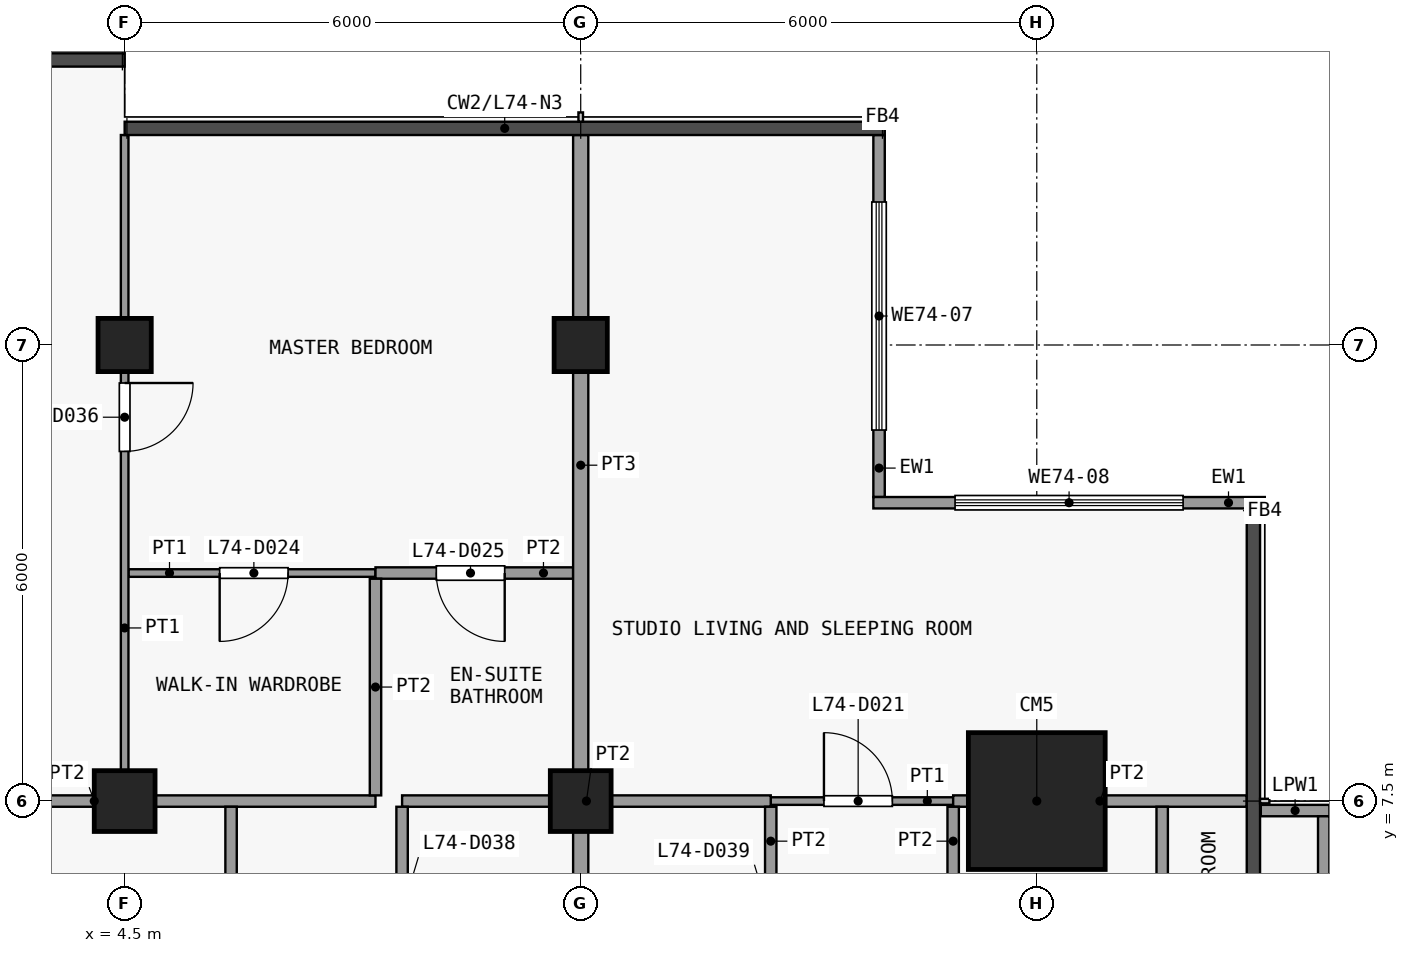
"""IFC4 building model, lengths in metres.
Left out: names, types, materials, properties, quantities, classifications, styles, units other than length and angle.
Written with IfcOpenShell. Run it as: python <this file> out.ifc"""

import sys

from ifc_helpers import new_model, si_unit, direction, frame, frame_2d, origin, origin_2d, place, context, subcontext, project, spatial, rectangle, extrude, element, fill, save


model = new_model("IFC4")
c1 = context("Model", 3, precision=1e-05, world=origin(), true_north=direction((0.0, 1.0)))
c2 = subcontext(c1, "Body", "Model", "MODEL_VIEW")
j1 = project(units=[si_unit("LENGTHUNIT", "METRE"), si_unit("PLANEANGLEUNIT", "RADIAN")], contexts=[c1])
p1 = place(None, origin())
s1 = spatial("IfcSite", under=j1, at=p1, CompositionType="ELEMENT")
p2 = place(p1, origin())
s2 = spatial("IfcBuilding", under=s1, at=p2, CompositionType="ELEMENT")
p3 = place(p2, frame((0.0, 0.0, 291.5)))
s3 = spatial("IfcBuildingStorey", under=s2, at=p3, CompositionType="ELEMENT", Elevation=291.5)
p4 = place(p3, frame((4.5, 7.5, 0.0), z_axis=(0.0, 0.0, 1.0), x_axis=(1.0, 0.0, 0.0)))
e1 = element("IfcColumn", 1, at=p4, inside=s3, PredefinedType="COLUMN", context=c2, shape_type="SweptSolid", body=[
    extrude(rectangle(XDim=0.8, YDim=0.8, at=origin_2d()), origin(), (0.0, 0.0, 1.0), 3.6),
])
p5 = place(p3, frame((4.5, 13.5, 0.0), z_axis=(0.0, 0.0, 1.0), x_axis=(1.0, 0.0, 0.0)))
e2 = element("IfcColumn", 2, at=p5, inside=s3, PredefinedType="COLUMN", context=c2, shape_type="SweptSolid", body=[
    extrude(rectangle(XDim=0.7, YDim=0.7, at=origin_2d()), origin(), (0.0, 0.0, 1.0), 3.6),
])
p6 = place(p3, frame((10.5, 7.5, 0.0), z_axis=(0.0, 0.0, 1.0), x_axis=(1.0, 0.0, 0.0)))
e3 = element("IfcColumn", 3, at=p6, inside=s3, PredefinedType="COLUMN", context=c2, shape_type="SweptSolid", body=[
    extrude(rectangle(XDim=0.8, YDim=0.8, at=origin_2d()), origin(), (0.0, 0.0, 1.0), 3.6),
])
p7 = place(p3, frame((10.5, 13.5, 0.0), z_axis=(0.0, 0.0, 1.0), x_axis=(1.0, 0.0, 0.0)))
e4 = element("IfcColumn", 4, at=p7, inside=s3, PredefinedType="COLUMN", context=c2, shape_type="SweptSolid", body=[
    extrude(rectangle(XDim=0.7, YDim=0.7, at=origin_2d()), origin(), (0.0, 0.0, 1.0), 3.6),
])
p8 = place(p3, frame((16.5, 7.5, 0.0), z_axis=(0.0, 0.0, 1.0), x_axis=(1.0, 0.0, 0.0)))
e5 = element("IfcColumn", 5, at=p8, inside=s3, PredefinedType="COLUMN", context=c2, shape_type="SweptSolid", body=[
    extrude(rectangle(XDim=1.8, YDim=1.8, at=origin_2d()), origin(), (0.0, 0.0, 1.0), 3.6),
])
p9 = place(p3, frame((14.425, 16.262, 0.0), z_axis=(0.0, 0.0, 1.0), x_axis=(0.0, -1.0, 0.0)))
e6 = element("IfcWall", 6, at=p9, inside=s3, PredefinedType="SOLIDWALL", context=c2, shape_type="SweptSolid", body=[
    extrude(rectangle(XDim=4.762, YDim=0.15, at=frame_2d((2.381, 0.0))), origin(), (0.0, 0.0, 1.0), 3.3),
])
p10 = place(p9, frame((0.881, 0.0, 0.9)))
e7 = element("IfcOpeningElement", 7, at=p10, cuts=e6, PredefinedType="OPENING", context=c2, shape_type="SweptSolid", body=[
    extrude(rectangle(XDim=3.0, YDim=2.4, at=frame_2d((1.5, 1.2))), frame((0.0, 0.085, 0.0), z_axis=(0.0, -1.0, 0.0), x_axis=(1.0, 0.0, 0.0)), (0.0, 0.0, 1.0), 0.17),
])
p11 = place(p3, frame((14.35, 11.425, 0.0), z_axis=(0.0, 0.0, 1.0), x_axis=(1.0, 0.0, 0.0)))
e8 = element("IfcWall", 8, at=p11, inside=s3, PredefinedType="SOLIDWALL", context=c2, shape_type="SweptSolid", body=[
    extrude(rectangle(XDim=5.15, YDim=0.15, at=frame_2d((2.575, 0.0))), origin(), (0.0, 0.0, 1.0), 3.3),
])
p12 = place(p11, frame((1.075, 0.0, 0.9)))
e9 = element("IfcOpeningElement", 9, at=p12, cuts=e8, PredefinedType="OPENING", context=c2, shape_type="SweptSolid", body=[
    extrude(rectangle(XDim=3.0, YDim=2.4, at=frame_2d((1.5, 1.2))), frame((0.0, 0.085, 0.0), z_axis=(0.0, -1.0, 0.0), x_axis=(1.0, 0.0, 0.0)), (0.0, 0.0, 1.0), 0.17),
])
p13 = place(p3, frame((19.448, 7.375, 0.0), z_axis=(0.0, 0.0, 1.0), x_axis=(1.0, 0.0, 0.0)))
e10 = element("IfcWall", 10, at=p13, inside=s3, PredefinedType="PARAPET", context=c2, shape_type="SweptSolid", body=[
    extrude(rectangle(XDim=0.903, YDim=0.15, at=frame_2d((0.451, 0.0))), origin(), (0.0, 0.0, 1.0), 1.15),
])
p14 = place(p3, frame((20.275, 7.3, 0.0), z_axis=(0.0, 0.0, 1.0), x_axis=(0.0, -1.0, 0.0)))
e11 = element("IfcWall", 11, at=p14, inside=s3, PredefinedType="PARAPET", context=c2, shape_type="SweptSolid", body=[
    extrude(rectangle(XDim=5.853, YDim=0.15, at=frame_2d((2.926, 0.0))), origin(), (0.0, 0.0, 1.0), 1.15),
])
p15 = place(p3, frame((13.0, 7.5, 0.0), z_axis=(0.0, 0.0, 1.0), x_axis=(1.0, 0.0, 0.0)))
e12 = element("IfcWall", 12, at=p15, inside=s3, PredefinedType="PARTITIONING", context=c2, shape_type="SweptSolid", body=[
    extrude(rectangle(XDim=2.4, YDim=0.1, at=frame_2d((1.2, 0.0))), origin(), (0.0, 0.0, 1.0), 3.3),
])
p16 = place(p15, frame((0.7, 0.0, 0.0)))
e13 = element("IfcOpeningElement", 13, at=p16, cuts=e12, PredefinedType="OPENING", context=c2, shape_type="SweptSolid", body=[
    extrude(rectangle(XDim=0.9, YDim=2.1, at=frame_2d((0.45, 1.05))), frame((0.0, 0.06, 0.0), z_axis=(0.0, -1.0, 0.0), x_axis=(1.0, 0.0, 0.0)), (0.0, 0.0, 1.0), 0.12),
])
p17 = place(p3, frame((0.4, 7.5, 0.0), z_axis=(0.0, 0.0, 1.0), x_axis=(1.0, 0.0, 0.0)))
e14 = element("IfcWall", 14, at=p17, inside=s3, PredefinedType="PARTITIONING", context=c2, shape_type="SweptSolid", body=[
    extrude(rectangle(XDim=7.4, YDim=0.15, at=frame_2d((3.7, 0.0))), origin(), (0.0, 0.0, 1.0), 3.3),
])
p18 = place(p3, frame((8.15, 7.5, 0.0), z_axis=(0.0, 0.0, 1.0), x_axis=(1.0, 0.0, 0.0)))
e15 = element("IfcWall", 15, at=p18, inside=s3, PredefinedType="PARTITIONING", context=c2, shape_type="SweptSolid", body=[
    extrude(rectangle(XDim=4.85, YDim=0.15, at=frame_2d((2.425, 0.0))), origin(), (0.0, 0.0, 1.0), 3.3),
])
p19 = place(p3, frame((15.4, 7.5, 0.0), z_axis=(0.0, 0.0, 1.0), x_axis=(1.0, 0.0, 0.0)))
e16 = element("IfcWall", 16, at=p19, inside=s3, PredefinedType="PARTITIONING", context=c2, shape_type="SweptSolid", body=[
    extrude(rectangle(XDim=3.863, YDim=0.15, at=frame_2d((1.931, 0.0))), origin(), (0.0, 0.0, 1.0), 3.3),
])
p20 = place(p3, frame((4.55, 10.5, 0.0), z_axis=(0.0, 0.0, 1.0), x_axis=(1.0, 0.0, 0.0)))
e17 = element("IfcWall", 17, at=p20, inside=s3, PredefinedType="PARTITIONING", context=c2, shape_type="SweptSolid", body=[
    extrude(rectangle(XDim=3.25, YDim=0.1, at=frame_2d((1.625, 0.0))), origin(), (0.0, 0.0, 1.0), 3.3),
])
p21 = place(p20, frame((1.2, 0.0, 0.0)))
e18 = element("IfcOpeningElement", 18, at=p21, cuts=e17, PredefinedType="OPENING", context=c2, shape_type="SweptSolid", body=[
    extrude(rectangle(XDim=0.9, YDim=2.1, at=frame_2d((0.45, 1.05))), frame((0.0, 0.06, 0.0), z_axis=(0.0, -1.0, 0.0), x_axis=(1.0, 0.0, 0.0)), (0.0, 0.0, 1.0), 0.12),
])
p22 = place(p3, frame((7.8, 10.5, 0.0), z_axis=(0.0, 0.0, 1.0), x_axis=(1.0, 0.0, 0.0)))
e19 = element("IfcWall", 19, at=p22, inside=s3, PredefinedType="PARTITIONING", context=c2, shape_type="SweptSolid", body=[
    extrude(rectangle(XDim=2.6, YDim=0.15, at=frame_2d((1.3, 0.0))), origin(), (0.0, 0.0, 1.0), 3.3),
])
p23 = place(p22, frame((0.8, 0.0, 0.0)))
e20 = element("IfcOpeningElement", 20, at=p23, cuts=e19, PredefinedType="OPENING", context=c2, shape_type="SweptSolid", body=[
    extrude(rectangle(XDim=0.9, YDim=2.1, at=frame_2d((0.45, 1.05))), frame((0.0, 0.085, 0.0), z_axis=(0.0, -1.0, 0.0), x_axis=(1.0, 0.0, 0.0)), (0.0, 0.0, 1.0), 0.17),
])
p24 = place(p3, frame((4.5, 7.575, 0.0), z_axis=(0.0, 0.0, 1.0), x_axis=(0.0, 1.0, 0.0)))
e21 = element("IfcWall", 21, at=p24, inside=s3, PredefinedType="PARTITIONING", context=c2, shape_type="SweptSolid", body=[
    extrude(rectangle(XDim=8.688, YDim=0.1, at=frame_2d((4.344, 0.0))), origin(), (0.0, 0.0, 1.0), 3.3),
])
p25 = place(p24, frame((4.525, 0.0, 0.0)))
e22 = element("IfcOpeningElement", 22, at=p25, cuts=e21, PredefinedType="OPENING", context=c2, shape_type="SweptSolid", body=[
    extrude(rectangle(XDim=0.9, YDim=2.1, at=frame_2d((0.45, 1.05))), frame((0.0, 0.06, 0.0), z_axis=(0.0, -1.0, 0.0), x_axis=(1.0, 0.0, 0.0)), (0.0, 0.0, 1.0), 0.12),
])
p26 = place(p3, frame((5.9, 4.6, 0.0), z_axis=(0.0, 0.0, 1.0), x_axis=(0.0, 1.0, 0.0)))
e23 = element("IfcWall", 23, at=p26, inside=s3, PredefinedType="PARTITIONING", context=c2, shape_type="SweptSolid", body=[
    extrude(rectangle(XDim=2.825, YDim=0.15, at=frame_2d((1.413, 0.0))), origin(), (0.0, 0.0, 1.0), 3.3),
])
p27 = place(p26, frame((1.0, 0.0, 0.0)))
e24 = element("IfcOpeningElement", 24, at=p27, cuts=e23, PredefinedType="OPENING", context=c2, shape_type="SweptSolid", body=[
    extrude(rectangle(XDim=0.9, YDim=2.1, at=frame_2d((0.45, 1.05))), frame((0.0, 0.085, 0.0), z_axis=(0.0, -1.0, 0.0), x_axis=(1.0, 0.0, 0.0)), (0.0, 0.0, 1.0), 0.17),
])
p28 = place(p3, frame((7.8, 7.575, 0.0), z_axis=(0.0, 0.0, 1.0), x_axis=(0.0, 1.0, 0.0)))
e25 = element("IfcWall", 25, at=p28, inside=s3, PredefinedType="PARTITIONING", context=c2, shape_type="SweptSolid", body=[
    extrude(rectangle(XDim=2.85, YDim=0.15, at=frame_2d((1.425, 0.0))), origin(), (0.0, 0.0, 1.0), 3.3),
])
p29 = place(p3, frame((8.15, 4.6, 0.0), z_axis=(0.0, 0.0, 1.0), x_axis=(0.0, 1.0, 0.0)))
e26 = element("IfcWall", 26, at=p29, inside=s3, PredefinedType="PARTITIONING", context=c2, shape_type="SweptSolid", body=[
    extrude(rectangle(XDim=2.825, YDim=0.15, at=frame_2d((1.413, 0.0))), origin(), (0.0, 0.0, 1.0), 3.3),
])
p30 = place(p29, frame((1.0, 0.0, 0.0)))
e27 = element("IfcOpeningElement", 27, at=p30, cuts=e26, PredefinedType="OPENING", context=c2, shape_type="SweptSolid", body=[
    extrude(rectangle(XDim=0.9, YDim=2.1, at=frame_2d((0.45, 1.05))), frame((0.0, 0.085, 0.0), z_axis=(0.0, -1.0, 0.0), x_axis=(1.0, 0.0, 0.0)), (0.0, 0.0, 1.0), 0.17),
])
p31 = place(p3, frame((10.5, 4.6, 0.0), z_axis=(0.0, 0.0, 1.0), x_axis=(0.0, 1.0, 0.0)))
e28 = element("IfcWall", 28, at=p31, inside=s3, PredefinedType="PARTITIONING", context=c2, shape_type="SweptSolid", body=[
    extrude(rectangle(XDim=2.825, YDim=0.2, at=frame_2d((1.413, 0.0))), origin(), (0.0, 0.0, 1.0), 3.3),
])
p32 = place(p3, frame((10.5, 7.575, 0.0), z_axis=(0.0, 0.0, 1.0), x_axis=(0.0, 1.0, 0.0)))
e29 = element("IfcWall", 29, at=p32, inside=s3, PredefinedType="PARTITIONING", context=c2, shape_type="SweptSolid", body=[
    extrude(rectangle(XDim=8.688, YDim=0.2, at=frame_2d((4.344, 0.0))), origin(), (0.0, 0.0, 1.0), 3.3),
])
p33 = place(p3, frame((13.0, 4.6, 0.0), z_axis=(0.0, 0.0, 1.0), x_axis=(0.0, 1.0, 0.0)))
e30 = element("IfcWall", 30, at=p33, inside=s3, PredefinedType="PARTITIONING", context=c2, shape_type="SweptSolid", body=[
    extrude(rectangle(XDim=2.825, YDim=0.15, at=frame_2d((1.413, 0.0))), origin(), (0.0, 0.0, 1.0), 3.3),
])
p34 = place(p33, frame((0.9, 0.0, 0.0)))
e31 = element("IfcOpeningElement", 31, at=p34, cuts=e30, PredefinedType="OPENING", context=c2, shape_type="SweptSolid", body=[
    extrude(rectangle(XDim=0.9, YDim=2.1, at=frame_2d((0.45, 1.05))), frame((0.0, 0.085, 0.0), z_axis=(0.0, -1.0, 0.0), x_axis=(1.0, 0.0, 0.0)), (0.0, 0.0, 1.0), 0.17),
])
p35 = place(p3, frame((15.4, 4.6, 0.0), z_axis=(0.0, 0.0, 1.0), x_axis=(0.0, 1.0, 0.0)))
e32 = element("IfcWall", 32, at=p35, inside=s3, PredefinedType="PARTITIONING", context=c2, shape_type="SweptSolid", body=[
    extrude(rectangle(XDim=2.825, YDim=0.15, at=frame_2d((1.413, 0.0))), origin(), (0.0, 0.0, 1.0), 3.3),
])
p36 = place(p35, frame((0.9, 0.0, 0.0)))
e33 = element("IfcOpeningElement", 33, at=p36, cuts=e32, PredefinedType="OPENING", context=c2, shape_type="SweptSolid", body=[
    extrude(rectangle(XDim=0.9, YDim=2.1, at=frame_2d((0.45, 1.05))), frame((0.0, 0.085, 0.0), z_axis=(0.0, -1.0, 0.0), x_axis=(1.0, 0.0, 0.0)), (0.0, 0.0, 1.0), 0.17),
])
p37 = place(p3, frame((18.15, 4.6, 0.0), z_axis=(0.0, 0.0, 1.0), x_axis=(0.0, 1.0, 0.0)))
e34 = element("IfcWall", 34, at=p37, inside=s3, PredefinedType="PARTITIONING", context=c2, shape_type="SweptSolid", body=[
    extrude(rectangle(XDim=2.825, YDim=0.15, at=frame_2d((1.413, 0.0))), origin(), (0.0, 0.0, 1.0), 3.3),
])
p38 = place(p37, frame((1.0, 0.0, 0.0)))
e35 = element("IfcOpeningElement", 35, at=p38, cuts=e34, PredefinedType="OPENING", context=c2, shape_type="SweptSolid", body=[
    extrude(rectangle(XDim=0.9, YDim=2.1, at=frame_2d((0.45, 1.05))), frame((0.0, 0.085, 0.0), z_axis=(0.0, -1.0, 0.0), x_axis=(1.0, 0.0, 0.0)), (0.0, 0.0, 1.0), 0.17),
])
p39 = place(p10, origin())
e36 = element("IfcWindow", 36, at=p39, inside=s3, PartitioningType="SINGLE_PANEL", PredefinedType="WINDOW", context=c2, shape_type="SweptSolid", body=[
    extrude(rectangle(XDim=3.0, YDim=2.4, at=frame_2d((1.5, 1.2))), frame((0.0, 0.03, 0.0), z_axis=(0.0, -1.0, 0.0), x_axis=(1.0, 0.0, 0.0)), (0.0, 0.0, 1.0), 0.06),
])
fill(e7, e36)
p40 = place(p12, origin())
e37 = element("IfcWindow", 37, at=p40, inside=s3, PartitioningType="SINGLE_PANEL", PredefinedType="WINDOW", context=c2, shape_type="SweptSolid", body=[
    extrude(rectangle(XDim=3.0, YDim=2.4, at=frame_2d((1.5, 1.2))), frame((0.0, 0.03, 0.0), z_axis=(0.0, -1.0, 0.0), x_axis=(1.0, 0.0, 0.0)), (0.0, 0.0, 1.0), 0.06),
])
fill(e9, e37)
p41 = place(p16, origin())
e38 = element("IfcDoor", 38, at=p41, inside=s3, OperationType="SINGLE_SWING_RIGHT", PredefinedType="DOOR", context=c2, shape_type="SweptSolid", body=[
    extrude(rectangle(XDim=0.9, YDim=2.1, at=frame_2d((0.45, 1.05))), frame((0.0, 0.025, 0.0), z_axis=(0.0, -1.0, 0.0), x_axis=(1.0, 0.0, 0.0)), (0.0, 0.0, 1.0), 0.05),
])
fill(e13, e38)
p42 = place(p21, origin())
e39 = element("IfcDoor", 39, at=p42, inside=s3, OperationType="SINGLE_SWING_LEFT", PredefinedType="DOOR", context=c2, shape_type="SweptSolid", body=[
    extrude(rectangle(XDim=0.9, YDim=2.1, at=frame_2d((0.45, 1.05))), frame((0.0, 0.025, 0.0), z_axis=(0.0, -1.0, 0.0), x_axis=(1.0, 0.0, 0.0)), (0.0, 0.0, 1.0), 0.05),
])
fill(e18, e39)
p43 = place(p23, origin())
e40 = element("IfcDoor", 40, at=p43, inside=s3, OperationType="SINGLE_SWING_RIGHT", PredefinedType="DOOR", context=c2, shape_type="SweptSolid", body=[
    extrude(rectangle(XDim=0.9, YDim=2.1, at=frame_2d((0.45, 1.05))), frame((0.0, 0.025, 0.0), z_axis=(0.0, -1.0, 0.0), x_axis=(1.0, 0.0, 0.0)), (0.0, 0.0, 1.0), 0.05),
])
fill(e20, e40)
p44 = place(p25, origin())
e41 = element("IfcDoor", 41, at=p44, inside=s3, OperationType="SINGLE_SWING_RIGHT", PredefinedType="DOOR", context=c2, shape_type="SweptSolid", body=[
    extrude(rectangle(XDim=0.9, YDim=2.1, at=frame_2d((0.45, 1.05))), frame((0.0, 0.025, 0.0), z_axis=(0.0, -1.0, 0.0), x_axis=(1.0, 0.0, 0.0)), (0.0, 0.0, 1.0), 0.05),
])
fill(e22, e41)
save(model, sys.argv[1])
